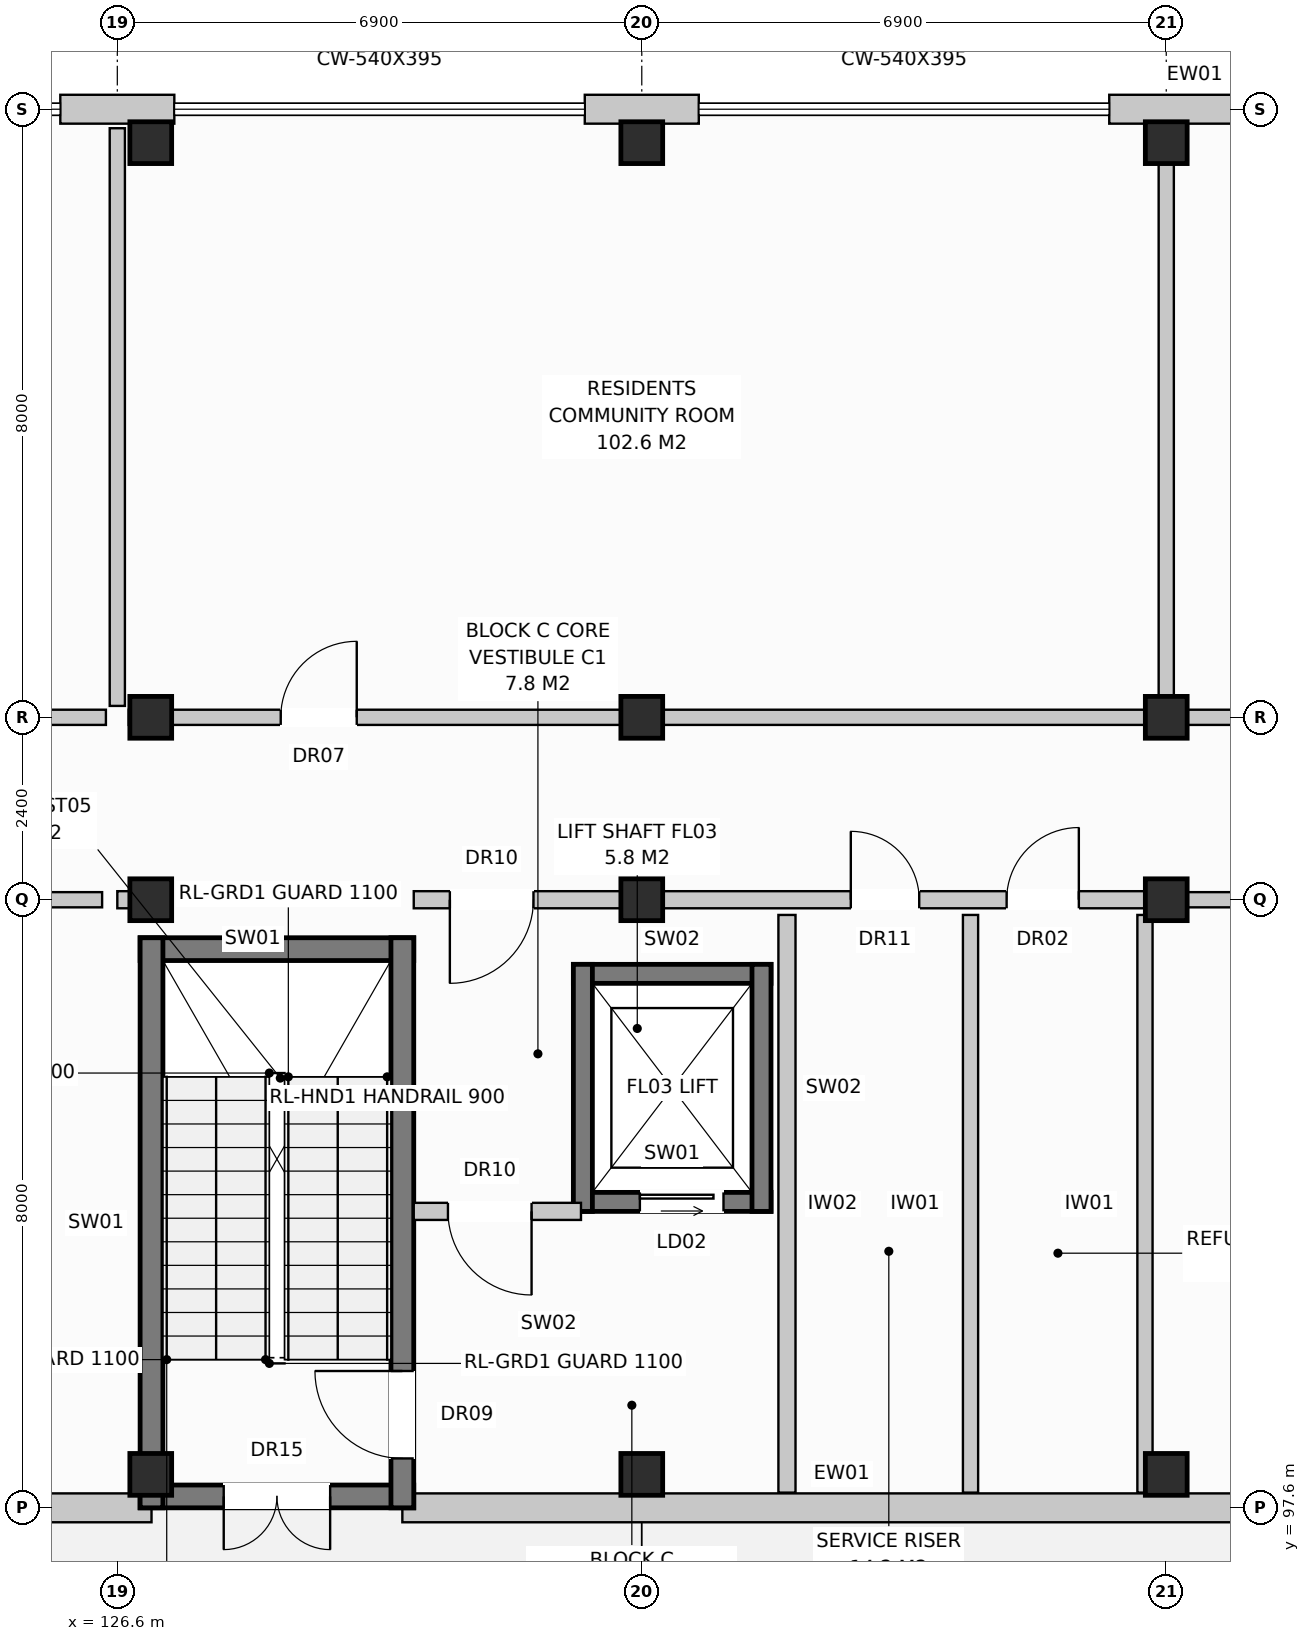
"""IFC4 building model, lengths in metres.
Left out: names, types, materials, properties, quantities, classifications, styles, units other than length and angle.
Written with IfcOpenShell. Run it as: python <this file> out.ifc"""

import sys

from ifc_helpers import new_model, si_unit, direction, frame, frame_2d, origin, origin_with_axes, origin_2d, place, context, subcontext, project, spatial, rectangle, extrude, element, fill, save


model = new_model("IFC4")
c1 = context("Model", 3, precision=1e-05, world=origin(), true_north=direction((0.0, 1.0)))
c2 = subcontext(c1, "Body", "Model", "MODEL_VIEW")
j1 = project(units=[si_unit("LENGTHUNIT", "METRE"), si_unit("PLANEANGLEUNIT", "RADIAN")], contexts=[c1])
p1 = place(None, origin())
s1 = spatial("IfcSite", under=j1, at=p1, CompositionType="ELEMENT")
p2 = place(p1, origin())
s2 = spatial("IfcBuilding", under=s1, at=p2, CompositionType="ELEMENT")
p3 = place(p2, origin())
s3 = spatial("IfcBuildingStorey", under=s2, at=p3, CompositionType="ELEMENT", Elevation=0.0)
for number, where, z_axis, x_axis in (
    (1, (127.04, 98.04, 0.0), (0.0, 0.0, 1.0), (1.0, 0.0, 0.0)),
    (2, (127.04, 105.6, 0.0), (0.0, 0.0, 1.0), (1.0, 0.0, 0.0)),
    (3, (127.04, 108.0, 0.0), (0.0, 0.0, 1.0), (1.0, 0.0, 0.0)),
    (4, (127.04, 115.56, 0.0), (0.0, 0.0, 1.0), (1.0, 0.0, 0.0)),
    (5, (133.5, 98.04, 0.0), (0.0, 0.0, 1.0), (1.0, 0.0, 0.0)),
    (6, (133.5, 105.6, 0.0), (0.0, 0.0, 1.0), (1.0, 0.0, 0.0)),
    (7, (133.5, 108.0, 0.0), (0.0, 0.0, 1.0), (1.0, 0.0, 0.0)),
    (8, (133.5, 115.56, 0.0), (0.0, 0.0, 1.0), (1.0, 0.0, 0.0)),
    (9, (140.4, 98.04, 0.0), (0.0, 0.0, 1.0), (1.0, 0.0, 0.0)),
    (10, (140.4, 105.6, 0.0), (0.0, 0.0, 1.0), (1.0, 0.0, 0.0)),
    (11, (140.4, 108.0, 0.0), (0.0, 0.0, 1.0), (1.0, 0.0, 0.0)),
    (12, (140.4, 115.56, 0.0), (0.0, 0.0, 1.0), (1.0, 0.0, 0.0)),
):
    element("IfcColumn", number, at=place(p3, frame(where, z_axis=z_axis, x_axis=x_axis)), inside=s3, PredefinedType="COLUMN", context=c2, shape_type="SweptSolid", body=[
        extrude(rectangle(XDim=0.55, YDim=0.55, at=origin_2d()), origin(), (0.0, 0.0, 1.0), 4.4),
    ])
p4 = place(p3, frame((125.65, 97.6, 0.0), z_axis=(0.0, 0.0, 1.0), x_axis=(1.0, 0.0, 0.0)))
e13 = element("IfcWall", 13, at=p4, inside=s3, PredefinedType="STANDARD", context=c2, shape_type="SweptSolid", body=[
    extrude(rectangle(XDim=1.4, YDim=0.38, at=frame_2d((0.7, 0.0))), origin(), (0.0, 0.0, 1.0), 4.12),
])
p5 = place(p3, frame((130.35, 97.6, 0.0), z_axis=(0.0, 0.0, 1.0), x_axis=(1.0, 0.0, 0.0)))
e14 = element("IfcWall", 14, at=p5, inside=s3, PredefinedType="STANDARD", context=c2, shape_type="SweptSolid", body=[
    extrude(rectangle(XDim=11.0, YDim=0.38, at=frame_2d((5.5, 0.0))), origin(), (0.0, 0.0, 1.0), 4.12),
])
for number, where, z_axis, x_axis in (
    (15, (125.85, 116.0, 0.0), (0.0, 0.0, 1.0), (1.0, 0.0, 0.0)),
    (16, (132.75, 116.0, 0.0), (0.0, 0.0, 1.0), (1.0, 0.0, 0.0)),
):
    element("IfcWall", number, at=place(p3, frame(where, z_axis=z_axis, x_axis=x_axis)), inside=s3, PredefinedType="STANDARD", context=c2, shape_type="SweptSolid", body=[
        extrude(rectangle(XDim=1.5, YDim=0.38, at=frame_2d((0.75, 0.0))), origin(), (0.0, 0.0, 1.0), 4.12),
    ])
p6 = place(p3, frame((139.65, 116.0, 0.0), z_axis=(0.0, 0.0, 1.0), x_axis=(1.0, 0.0, 0.0)))
e17 = element("IfcWall", 17, at=p6, inside=s3, PredefinedType="STANDARD", context=c2, shape_type="SweptSolid", body=[
    extrude(rectangle(XDim=4.05, YDim=0.38, at=frame_2d((2.025, 0.0))), origin(), (0.0, 0.0, 1.0), 4.12),
])
p7 = place(p6, frame((2.0, 0.0, 0.0)))
e18 = element("IfcOpeningElement", 18, at=p7, cuts=e17, PredefinedType="OPENING", context=c2, shape_type="SweptSolid", body=[
    extrude(rectangle(XDim=1.6, YDim=2.3, at=frame_2d((0.8, 1.15))), frame((0.0, 0.202, 0.0), z_axis=(0.0, -1.0, 0.0), x_axis=(1.0, 0.0, 0.0)), (0.0, 0.0, 1.0), 0.404),
])
p8 = place(p3, frame((126.9, 97.75, 0.0), z_axis=(0.0, 0.0, 1.0), x_axis=(1.0, 0.0, 0.0)))
e19 = element("IfcWall", 19, at=p8, inside=s3, PredefinedType="SHEAR", context=c2, shape_type="SweptSolid", body=[
    extrude(rectangle(XDim=3.6, YDim=0.3, at=frame_2d((1.8, 0.0))), origin(), (0.0, 0.0, 1.0), 4.12),
])
p9 = place(p8, frame((1.1, 0.0, 0.0)))
e20 = element("IfcOpeningElement", 20, at=p9, cuts=e19, PredefinedType="OPENING", context=c2, shape_type="SweptSolid", body=[
    extrude(rectangle(XDim=1.4, YDim=2.25, at=frame_2d((0.7, 1.125))), frame((0.0, 0.162, 0.0), z_axis=(0.0, -1.0, 0.0), x_axis=(1.0, 0.0, 0.0)), (0.0, 0.0, 1.0), 0.324),
])
p10 = place(p3, frame((126.9, 104.95, 0.0), z_axis=(0.0, 0.0, 1.0), x_axis=(1.0, 0.0, 0.0)))
e21 = element("IfcWall", 21, at=p10, inside=s3, PredefinedType="SHEAR", context=c2, shape_type="SweptSolid", body=[
    extrude(rectangle(XDim=3.6, YDim=0.3, at=frame_2d((1.8, 0.0))), origin(), (0.0, 0.0, 1.0), 4.12),
])
p11 = place(p3, frame((127.05, 97.6, 0.0), z_axis=(0.0, 0.0, 1.0), x_axis=(0.0, 1.0, 0.0)))
e22 = element("IfcWall", 22, at=p11, inside=s3, PredefinedType="SHEAR", context=c2, shape_type="SweptSolid", body=[
    extrude(rectangle(XDim=7.5, YDim=0.3, at=frame_2d((3.75, 0.0))), origin(), (0.0, 0.0, 1.0), 4.12),
])
p12 = place(p3, frame((130.35, 97.6, 0.0), z_axis=(0.0, 0.0, 1.0), x_axis=(0.0, 1.0, 0.0)))
e23 = element("IfcWall", 23, at=p12, inside=s3, PredefinedType="SHEAR", context=c2, shape_type="SweptSolid", body=[
    extrude(rectangle(XDim=7.5, YDim=0.3, at=frame_2d((3.75, 0.0))), origin(), (0.0, 0.0, 1.0), 4.12),
])
p13 = place(p12, frame((0.65, 0.0, 0.0)))
e24 = element("IfcOpeningElement", 24, at=p13, cuts=e23, PredefinedType="OPENING", context=c2, shape_type="SweptSolid", body=[
    extrude(rectangle(XDim=1.15, YDim=2.15, at=frame_2d((0.575, 1.075))), frame((0.0, 0.162, 0.0), z_axis=(0.0, -1.0, 0.0), x_axis=(1.0, 0.0, 0.0)), (0.0, 0.0, 1.0), 0.324),
])
p14 = place(p3, frame((132.6, 101.625, 0.0), z_axis=(0.0, 0.0, 1.0), x_axis=(1.0, 0.0, 0.0)))
e25 = element("IfcWall", 25, at=p14, inside=s3, PredefinedType="SHEAR", context=c2, shape_type="SweptSolid", body=[
    extrude(rectangle(XDim=2.6, YDim=0.25, at=frame_2d((1.3, 0.0))), origin(), (0.0, 0.0, 1.0), 4.12),
])
p15 = place(p14, frame((0.875, 0.0, 0.0)))
e26 = element("IfcOpeningElement", 26, at=p15, cuts=e25, PredefinedType="OPENING", context=c2, shape_type="SweptSolid", body=[
    extrude(rectangle(XDim=1.1, YDim=2.1, at=frame_2d((0.55, 1.05))), frame((0.0, 0.137, 0.0), z_axis=(0.0, -1.0, 0.0), x_axis=(1.0, 0.0, 0.0)), (0.0, 0.0, 1.0), 0.274),
])
p16 = place(p3, frame((132.6, 104.625, 0.0), z_axis=(0.0, 0.0, 1.0), x_axis=(1.0, 0.0, 0.0)))
e27 = element("IfcWall", 27, at=p16, inside=s3, PredefinedType="SHEAR", context=c2, shape_type="SweptSolid", body=[
    extrude(rectangle(XDim=2.6, YDim=0.25, at=frame_2d((1.3, 0.0))), origin(), (0.0, 0.0, 1.0), 4.12),
])
for number, where, z_axis, x_axis in (
    (28, (132.725, 101.5, 0.0), (0.0, 0.0, 1.0), (0.0, 1.0, 0.0)),
    (29, (135.075, 101.5, 0.0), (0.0, 0.0, 1.0), (0.0, 1.0, 0.0)),
):
    element("IfcWall", number, at=place(p3, frame(where, z_axis=z_axis, x_axis=x_axis)), inside=s3, PredefinedType="SHEAR", context=c2, shape_type="SweptSolid", body=[
        extrude(rectangle(XDim=3.25, YDim=0.25, at=frame_2d((1.625, 0.0))), origin(), (0.0, 0.0, 1.0), 4.12),
    ])
p17 = place(p3, frame((135.41, 97.8, 0.0), z_axis=(0.0, 0.0, 1.0), x_axis=(0.0, 1.0, 0.0)))
e30 = element("IfcWall", 30, at=p17, inside=s3, PredefinedType="PARTITIONING", context=c2, shape_type="SweptSolid", body=[
    extrude(rectangle(XDim=7.6, YDim=0.225, at=frame_2d((3.8, 0.0))), origin(), (0.0, 0.0, 1.0), 4.12),
])
p18 = place(p3, frame((130.5, 101.5, 0.0), z_axis=(0.0, 0.0, 1.0), x_axis=(1.0, 0.0, 0.0)))
e31 = element("IfcWall", 31, at=p18, inside=s3, PredefinedType="PARTITIONING", context=c2, shape_type="SweptSolid", body=[
    extrude(rectangle(XDim=2.2, YDim=0.225, at=frame_2d((1.1, 0.0))), origin(), (0.0, 0.0, 1.0), 4.12),
])
p19 = place(p18, frame((0.45, 0.0, 0.0)))
e32 = element("IfcOpeningElement", 32, at=p19, cuts=e31, PredefinedType="OPENING", context=c2, shape_type="SweptSolid", body=[
    extrude(rectangle(XDim=1.1, YDim=2.15, at=frame_2d((0.55, 1.075))), frame((0.0, 0.125, 0.0), z_axis=(0.0, -1.0, 0.0), x_axis=(1.0, 0.0, 0.0)), (0.0, 0.0, 1.0), 0.249),
])
p20 = place(p3, frame((126.6, 105.6, 0.0), z_axis=(0.0, 0.0, 1.0), x_axis=(1.0, 0.0, 0.0)))
e33 = element("IfcWall", 33, at=p20, inside=s3, PredefinedType="PARTITIONING", context=c2, shape_type="SweptSolid", body=[
    extrude(rectangle(XDim=0.3, YDim=0.225, at=frame_2d((0.15, 0.0))), origin(), (0.0, 0.0, 1.0), 4.12),
])
for number, where, z_axis, x_axis in (
    (34, (137.825, 97.8, 0.0), (0.0, 0.0, 1.0), (0.0, 1.0, 0.0)),
    (35, (140.12, 97.8, 0.0), (0.0, 0.0, 1.0), (0.0, 1.0, 0.0)),
):
    element("IfcWall", number, at=place(p3, frame(where, z_axis=z_axis, x_axis=x_axis)), inside=s3, PredefinedType="PARTITIONING", context=c2, shape_type="SweptSolid", body=[
        extrude(rectangle(XDim=7.6, YDim=0.2, at=frame_2d((3.8, 0.0))), origin(), (0.0, 0.0, 1.0), 4.12),
    ])
p21 = place(p3, frame((130.5, 105.6, 0.0), z_axis=(0.0, 0.0, 1.0), x_axis=(1.0, 0.0, 0.0)))
e36 = element("IfcWall", 36, at=p21, inside=s3, PredefinedType="PARTITIONING", context=c2, shape_type="SweptSolid", body=[
    extrude(rectangle(XDim=9.9, YDim=0.225, at=frame_2d((4.95, 0.0))), origin(), (0.0, 0.0, 1.0), 3.56),
])
p22 = place(p21, frame((0.475, 0.0, 0.0)))
e37 = element("IfcOpeningElement", 37, at=p22, cuts=e36, PredefinedType="OPENING", context=c2, shape_type="SweptSolid", body=[
    extrude(rectangle(XDim=1.1, YDim=2.15, at=frame_2d((0.55, 1.075))), frame((0.0, 0.125, 0.0), z_axis=(0.0, -1.0, 0.0), x_axis=(1.0, 0.0, 0.0)), (0.0, 0.0, 1.0), 0.249),
])
p23 = place(p21, frame((5.75, 0.0, 0.0)))
e38 = element("IfcOpeningElement", 38, at=p23, cuts=e36, PredefinedType="OPENING", context=c2, shape_type="SweptSolid", body=[
    extrude(rectangle(XDim=0.9, YDim=2.1, at=frame_2d((0.45, 1.05))), frame((0.0, 0.125, 0.0), z_axis=(0.0, -1.0, 0.0), x_axis=(1.0, 0.0, 0.0)), (0.0, 0.0, 1.0), 0.249),
])
p24 = place(p21, frame((7.8, 0.0, 0.0)))
e39 = element("IfcOpeningElement", 39, at=p24, cuts=e36, PredefinedType="OPENING", context=c2, shape_type="SweptSolid", body=[
    extrude(rectangle(XDim=0.95, YDim=2.15, at=frame_2d((0.475, 1.075))), frame((0.0, 0.125, 0.0), z_axis=(0.0, -1.0, 0.0), x_axis=(1.0, 0.0, 0.0)), (0.0, 0.0, 1.0), 0.249),
])
p25 = place(p3, frame((113.1, 108.0, 0.0), z_axis=(0.0, 0.0, 1.0), x_axis=(1.0, 0.0, 0.0)))
e40 = element("IfcWall", 40, at=p25, inside=s3, PredefinedType="PARTITIONING", context=c2, shape_type="SweptSolid", body=[
    extrude(rectangle(XDim=13.35, YDim=0.2, at=frame_2d((6.675, 0.0))), origin(), (0.0, 0.0, 1.0), 3.56),
])
p26 = place(p25, frame((2.0, 0.0, 0.0)))
e41 = element("IfcOpeningElement", 41, at=p26, cuts=e40, PredefinedType="OPENING", context=c2, shape_type="SweptSolid", body=[
    extrude(rectangle(XDim=1.0, YDim=2.15, at=frame_2d((0.5, 1.075))), frame((0.0, 0.112, 0.0), z_axis=(0.0, -1.0, 0.0), x_axis=(1.0, 0.0, 0.0)), (0.0, 0.0, 1.0), 0.224),
])
p27 = place(p3, frame((126.6, 108.15, 0.0), z_axis=(0.0, 0.0, 1.0), x_axis=(0.0, 1.0, 0.0)))
e42 = element("IfcWall", 42, at=p27, inside=s3, PredefinedType="PARTITIONING", context=c2, shape_type="SweptSolid", body=[
    extrude(rectangle(XDim=7.6, YDim=0.2, at=frame_2d((3.8, 0.0))), origin(), (0.0, 0.0, 1.0), 4.12),
])
p28 = place(p3, frame((126.75, 108.0, 0.0), z_axis=(0.0, 0.0, 1.0), x_axis=(1.0, 0.0, 0.0)))
e43 = element("IfcWall", 43, at=p28, inside=s3, PredefinedType="PARTITIONING", context=c2, shape_type="SweptSolid", body=[
    extrude(rectangle(XDim=13.5, YDim=0.2, at=frame_2d((6.75, 0.0))), origin(), (0.0, 0.0, 1.0), 3.56),
])
p29 = place(p28, frame((2.0, 0.0, 0.0)))
e44 = element("IfcOpeningElement", 44, at=p29, cuts=e43, PredefinedType="OPENING", context=c2, shape_type="SweptSolid", body=[
    extrude(rectangle(XDim=1.0, YDim=2.15, at=frame_2d((0.5, 1.075))), frame((0.0, 0.112, 0.0), z_axis=(0.0, -1.0, 0.0), x_axis=(1.0, 0.0, 0.0)), (0.0, 0.0, 1.0), 0.224),
])
p30 = place(p3, frame((140.4, 108.15, 0.0), z_axis=(0.0, 0.0, 1.0), x_axis=(0.0, 1.0, 0.0)))
e45 = element("IfcWall", 45, at=p30, inside=s3, PredefinedType="PARTITIONING", context=c2, shape_type="SweptSolid", body=[
    extrude(rectangle(XDim=7.6, YDim=0.2, at=frame_2d((3.8, 0.0))), origin(), (0.0, 0.0, 1.0), 4.12),
])
p31 = place(p3, frame((140.55, 108.0, 0.0), z_axis=(0.0, 0.0, 1.0), x_axis=(1.0, 0.0, 0.0)))
e46 = element("IfcWall", 46, at=p31, inside=s3, PredefinedType="PARTITIONING", context=c2, shape_type="SweptSolid", body=[
    extrude(rectangle(XDim=13.5, YDim=0.2, at=frame_2d((6.75, 0.0))), origin(), (0.0, 0.0, 1.0), 3.56),
])
p32 = place(p31, frame((2.0, 0.0, 0.0)))
e47 = element("IfcOpeningElement", 47, at=p32, cuts=e46, PredefinedType="OPENING", context=c2, shape_type="SweptSolid", body=[
    extrude(rectangle(XDim=1.0, YDim=2.15, at=frame_2d((0.5, 1.075))), frame((0.0, 0.112, 0.0), z_axis=(0.0, -1.0, 0.0), x_axis=(1.0, 0.0, 0.0)), (0.0, 0.0, 1.0), 0.224),
])
p33 = place(p3, frame((113.05, 105.6, 0.0), z_axis=(0.0, 0.0, 1.0), x_axis=(1.0, 0.0, 0.0)))
e48 = element("IfcWall", 48, at=p33, inside=s3, PredefinedType="PARTITIONING", context=c2, shape_type="SweptSolid", body=[
    extrude(rectangle(XDim=13.35, YDim=0.2, at=frame_2d((6.675, 0.0))), origin(), (0.0, 0.0, 1.0), 3.56),
])
p34 = place(p33, frame((1.9, 0.0, 0.0)))
e49 = element("IfcOpeningElement", 49, at=p34, cuts=e48, PredefinedType="OPENING", context=c2, shape_type="SweptSolid", body=[
    extrude(rectangle(XDim=0.95, YDim=2.15, at=frame_2d((0.475, 1.075))), frame((0.0, 0.112, 0.0), z_axis=(0.0, -1.0, 0.0), x_axis=(1.0, 0.0, 0.0)), (0.0, 0.0, 1.0), 0.224),
])
p35 = place(p3, frame((140.6, 105.6, 0.0), z_axis=(0.0, 0.0, 1.0), x_axis=(1.0, 0.0, 0.0)))
e50 = element("IfcWall", 50, at=p35, inside=s3, PredefinedType="PARTITIONING", context=c2, shape_type="SweptSolid", body=[
    extrude(rectangle(XDim=6.5, YDim=0.2, at=frame_2d((3.25, 0.0))), origin(), (0.0, 0.0, 1.0), 3.56),
])
p36 = place(p35, frame((1.9, 0.0, 0.0)))
e51 = element("IfcOpeningElement", 51, at=p36, cuts=e50, PredefinedType="OPENING", context=c2, shape_type="SweptSolid", body=[
    extrude(rectangle(XDim=0.95, YDim=2.15, at=frame_2d((0.475, 1.075))), frame((0.0, 0.112, 0.0), z_axis=(0.0, -1.0, 0.0), x_axis=(1.0, 0.0, 0.0)), (0.0, 0.0, 1.0), 0.224),
])
p37 = place(p9, frame((1.4, 0.0, 0.0), z_axis=(0.0, 0.0, 1.0), x_axis=(-1.0, 0.0, 0.0)))
e52 = element("IfcDoor", 52, at=p37, inside=s3, OperationType="DOUBLE_DOOR_SINGLE_SWING", PredefinedType="DOOR", context=c2, shape_type="SweptSolid", body=[
    extrude(rectangle(XDim=1.4, YDim=2.25, at=frame_2d((0.7, 1.125))), frame((0.0, 0.025, 0.0), z_axis=(0.0, -1.0, 0.0), x_axis=(1.0, 0.0, 0.0)), (0.0, 0.0, 1.0), 0.05),
])
fill(e20, e52)
p38 = place(p13, origin_with_axes())
e53 = element("IfcDoor", 53, at=p38, inside=s3, OperationType="SINGLE_SWING_RIGHT", PredefinedType="DOOR", context=c2, shape_type="SweptSolid", body=[
    extrude(rectangle(XDim=1.15, YDim=2.15, at=frame_2d((0.575, 1.075))), frame((0.0, 0.025, 0.0), z_axis=(0.0, -1.0, 0.0), x_axis=(1.0, 0.0, 0.0)), (0.0, 0.0, 1.0), 0.05),
])
fill(e24, e53)
p39 = place(p15, origin_with_axes())
e54 = element("IfcDoor", 54, at=p39, inside=s3, OperationType="SLIDING_TO_LEFT", PredefinedType="DOOR", context=c2, shape_type="SweptSolid", body=[
    extrude(rectangle(XDim=1.1, YDim=2.1, at=frame_2d((0.55, 1.05))), frame((0.0, 0.025, 0.0), z_axis=(0.0, -1.0, 0.0), x_axis=(1.0, 0.0, 0.0)), (0.0, 0.0, 1.0), 0.05),
])
fill(e26, e54)
p40 = place(p19, frame((1.1, 0.0, 0.0), z_axis=(0.0, 0.0, 1.0), x_axis=(-1.0, 0.0, 0.0)))
e55 = element("IfcDoor", 55, at=p40, inside=s3, OperationType="SINGLE_SWING_RIGHT", PredefinedType="DOOR", context=c2, shape_type="SweptSolid", body=[
    extrude(rectangle(XDim=1.1, YDim=2.15, at=frame_2d((0.55, 1.075))), frame((0.0, 0.025, 0.0), z_axis=(0.0, -1.0, 0.0), x_axis=(1.0, 0.0, 0.0)), (0.0, 0.0, 1.0), 0.05),
])
fill(e32, e55)
p41 = place(p22, frame((1.1, 0.0, 0.0), z_axis=(0.0, 0.0, 1.0), x_axis=(-1.0, 0.0, 0.0)))
e56 = element("IfcDoor", 56, at=p41, inside=s3, OperationType="SINGLE_SWING_LEFT", PredefinedType="DOOR", context=c2, shape_type="SweptSolid", body=[
    extrude(rectangle(XDim=1.1, YDim=2.15, at=frame_2d((0.55, 1.075))), frame((0.0, 0.025, 0.0), z_axis=(0.0, -1.0, 0.0), x_axis=(1.0, 0.0, 0.0)), (0.0, 0.0, 1.0), 0.05),
])
fill(e37, e56)
p42 = place(p23, origin_with_axes())
e57 = element("IfcDoor", 57, at=p42, inside=s3, OperationType="SINGLE_SWING_LEFT", PredefinedType="DOOR", context=c2, shape_type="SweptSolid", body=[
    extrude(rectangle(XDim=0.9, YDim=2.1, at=frame_2d((0.45, 1.05))), frame((0.0, 0.025, 0.0), z_axis=(0.0, -1.0, 0.0), x_axis=(1.0, 0.0, 0.0)), (0.0, 0.0, 1.0), 0.05),
])
fill(e38, e57)
p43 = place(p24, origin_with_axes())
e58 = element("IfcDoor", 58, at=p43, inside=s3, OperationType="SINGLE_SWING_RIGHT", PredefinedType="DOOR", context=c2, shape_type="SweptSolid", body=[
    extrude(rectangle(XDim=0.95, YDim=2.15, at=frame_2d((0.475, 1.075))), frame((0.0, 0.025, 0.0), z_axis=(0.0, -1.0, 0.0), x_axis=(1.0, 0.0, 0.0)), (0.0, 0.0, 1.0), 0.05),
])
fill(e39, e58)
p44 = place(p29, origin_with_axes())
e59 = element("IfcDoor", 59, at=p44, inside=s3, OperationType="SINGLE_SWING_RIGHT", PredefinedType="DOOR", context=c2, shape_type="SweptSolid", body=[
    extrude(rectangle(XDim=1.0, YDim=2.15, at=frame_2d((0.5, 1.075))), frame((0.0, 0.025, 0.0), z_axis=(0.0, -1.0, 0.0), x_axis=(1.0, 0.0, 0.0)), (0.0, 0.0, 1.0), 0.05),
])
fill(e44, e59)
save(model, sys.argv[1])
